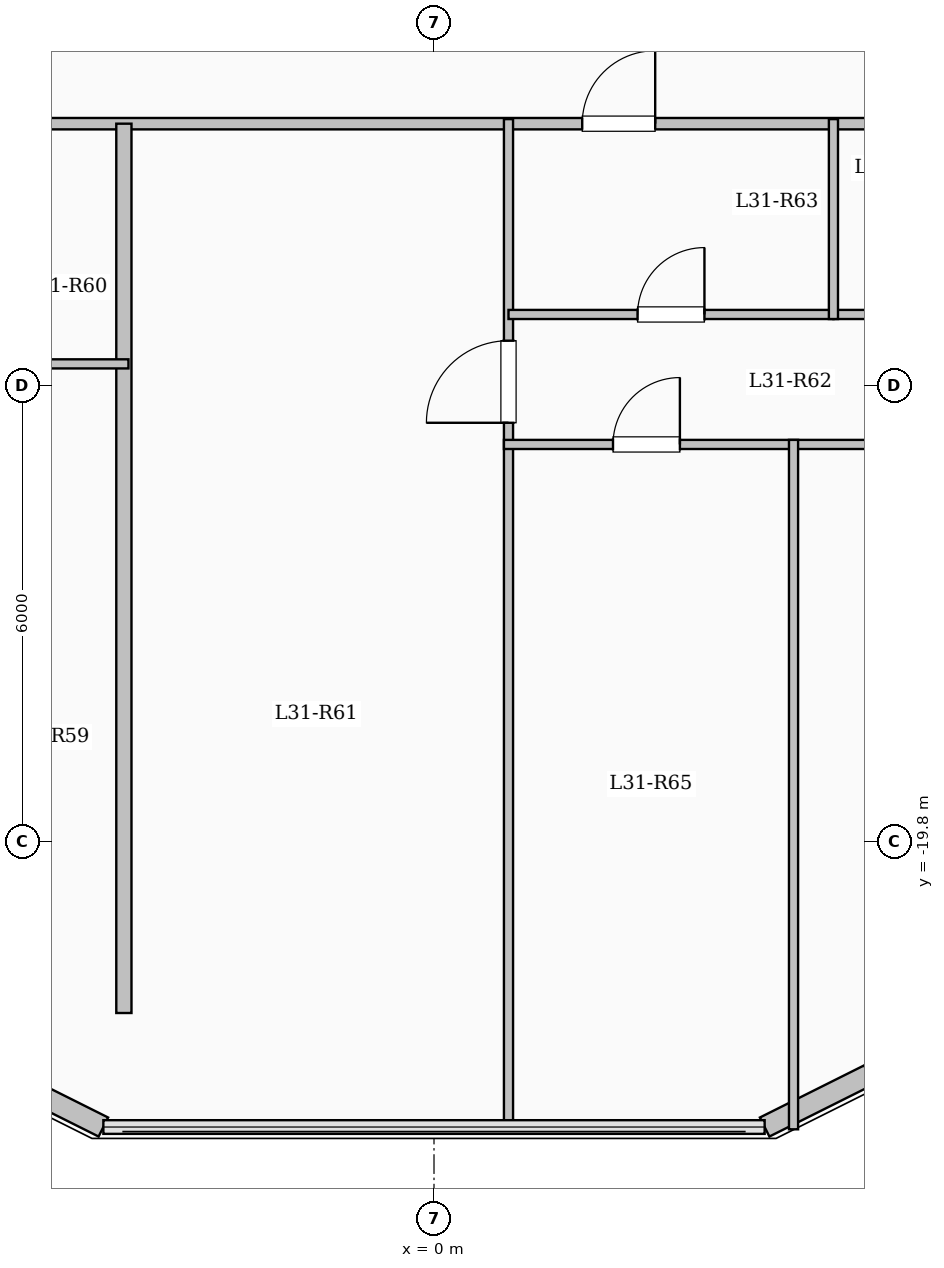
"""IFC4 building model, lengths in metres.
Left out: names, types, materials, properties, quantities, classifications, styles, units other than length and angle.
Written with IfcOpenShell. Run it as: python <this file> out.ifc"""

import sys

from ifc_helpers import new_model, si_unit, direction, frame, frame_2d, origin, place, context, subcontext, project, spatial, rectangle, extrude, element, fill, save


model = new_model("IFC4")
c1 = context("Model", 3, precision=1e-05, world=origin(), true_north=direction((0.0, 1.0)))
c2 = subcontext(c1, "Body", "Model", "MODEL_VIEW")
j1 = project(units=[si_unit("LENGTHUNIT", "METRE"), si_unit("PLANEANGLEUNIT", "RADIAN")], contexts=[c1])
p1 = place(None, origin())
s1 = spatial("IfcSite", under=j1, at=p1, CompositionType="ELEMENT")
p2 = place(p1, origin())
s2 = spatial("IfcBuilding", under=s1, at=p2, CompositionType="ELEMENT")
p3 = place(p2, frame((0.0, 0.0, 115.15)))
s3 = spatial("IfcBuildingStorey", under=s2, at=p3, CompositionType="ELEMENT", Elevation=115.15)
p4 = place(p3, frame((7.35, -22.05, 0.0), z_axis=(0.0, 0.0, 1.0), x_axis=(-0.894427191, -0.4472135955, 0.0)))
e1 = element("IfcWall", 1, at=p4, inside=s3, PredefinedType="SOLIDWALL", context=c2, shape_type="SweptSolid", body=[
    extrude(rectangle(XDim=3.354, YDim=0.28, at=frame_2d((1.677, 0.0))), origin(), (0.0, 0.0, 1.0), 3.05),
])
p5 = place(p4, frame((0.622, 0.0, 0.95)))
e2 = element("IfcOpeningElement", 2, at=p5, cuts=e1, PredefinedType="OPENING", context=c2, shape_type="SweptSolid", body=[
    extrude(rectangle(XDim=1.2, YDim=1.5, at=frame_2d((0.6, 0.75))), frame((0.0, 0.15, 0.0), z_axis=(0.0, -1.0, 0.0), x_axis=(1.0, 0.0, 0.0)), (0.0, 0.0, 1.0), 0.3),
])
p6 = place(p3, frame((-4.35, -23.55, 0.0), z_axis=(0.0, 0.0, 1.0), x_axis=(-0.894427191, 0.4472135955, 0.0)))
e3 = element("IfcWall", 3, at=p6, inside=s3, PredefinedType="SOLIDWALL", context=c2, shape_type="SweptSolid", body=[
    extrude(rectangle(XDim=3.354, YDim=0.28, at=frame_2d((1.677, 0.0))), origin(), (0.0, 0.0, 1.0), 3.05),
])
p7 = place(p6, frame((2.124, 0.0, 0.95)))
e4 = element("IfcOpeningElement", 4, at=p7, cuts=e3, PredefinedType="OPENING", context=c2, shape_type="SweptSolid", body=[
    extrude(rectangle(XDim=0.85, YDim=1.5, at=frame_2d((0.425, 0.75))), frame((0.0, 0.15, 0.0), z_axis=(0.0, -1.0, 0.0), x_axis=(1.0, 0.0, 0.0)), (0.0, 0.0, 1.0), 0.3),
])
p8 = place(p3, frame((-8.55, -10.35, 0.0), z_axis=(0.0, 0.0, 1.0), x_axis=(1.0, 0.0, 0.0)))
e5 = element("IfcWall", 5, at=p8, inside=s3, PredefinedType="PARTITIONING", context=c2, shape_type="SweptSolid", body=[
    extrude(rectangle(XDim=17.1, YDim=0.15, at=frame_2d((8.55, 0.0))), origin(), (0.0, 0.0, 1.0), 3.05),
])
p9 = place(p8, frame((1.15, 0.0, 0.0)))
e6 = element("IfcOpeningElement", 6, at=p9, cuts=e5, PredefinedType="OPENING", context=c2, shape_type="SweptSolid", body=[
    extrude(rectangle(XDim=0.96, YDim=2.15, at=frame_2d((0.48, 1.075))), frame((0.0, 0.085, 0.0), z_axis=(0.0, -1.0, 0.0), x_axis=(1.0, 0.0, 0.0)), (0.0, 0.0, 1.0), 0.17),
])
p10 = place(p8, frame((10.5, 0.0, 0.0)))
e7 = element("IfcOpeningElement", 7, at=p10, cuts=e5, PredefinedType="OPENING", context=c2, shape_type="SweptSolid", body=[
    extrude(rectangle(XDim=0.96, YDim=2.15, at=frame_2d((0.48, 1.075))), frame((0.0, 0.085, 0.0), z_axis=(0.0, -1.0, 0.0), x_axis=(1.0, 0.0, 0.0)), (0.0, 0.0, 1.0), 0.17),
])
p11 = place(p3, frame((-4.08, -22.05, 0.0), z_axis=(0.0, 0.0, 1.0), x_axis=(0.0, 1.0, 0.0)))
e8 = element("IfcWall", 8, at=p11, inside=s3, PredefinedType="SOLIDWALL", context=c2, shape_type="SweptSolid", body=[
    extrude(rectangle(XDim=11.7, YDim=0.2, at=frame_2d((5.85, 0.0))), origin(), (0.0, 0.0, 1.0), 3.05),
])
p12 = place(p3, frame((-6.14, -13.51, 0.0), z_axis=(0.0, 0.0, 1.0), x_axis=(1.0, 0.0, 0.0)))
e9 = element("IfcWall", 9, at=p12, inside=s3, PredefinedType="PARTITIONING", context=c2, shape_type="SweptSolid", body=[
    extrude(rectangle(XDim=2.12, YDim=0.12, at=frame_2d((1.06, 0.0))), origin(), (0.0, 0.0, 1.0), 3.05),
])
p13 = place(p3, frame((0.98, -23.58, 0.0), z_axis=(0.0, 0.0, 1.0), x_axis=(0.0, 1.0, 0.0)))
e10 = element("IfcWall", 10, at=p13, inside=s3, PredefinedType="PARTITIONING", context=c2, shape_type="SweptSolid", body=[
    extrude(rectangle(XDim=13.29, YDim=0.12, at=frame_2d((6.645, 0.0))), origin(), (0.0, 0.0, 1.0), 3.05),
])
p14 = place(p13, frame((9.295, 0.0, 0.0)))
e11 = element("IfcOpeningElement", 11, at=p14, cuts=e10, PredefinedType="OPENING", context=c2, shape_type="SweptSolid", body=[
    extrude(rectangle(XDim=1.08, YDim=2.15, at=frame_2d((0.54, 1.075))), frame((0.0, 0.07, 0.0), z_axis=(0.0, -1.0, 0.0), x_axis=(1.0, 0.0, 0.0)), (0.0, 0.0, 1.0), 0.14),
])
p15 = place(p3, frame((0.98, -12.86, 0.0), z_axis=(0.0, 0.0, 1.0), x_axis=(1.0, 0.0, 0.0)))
e12 = element("IfcWall", 12, at=p15, inside=s3, PredefinedType="PARTITIONING", context=c2, shape_type="SweptSolid", body=[
    extrude(rectangle(XDim=4.275, YDim=0.12, at=frame_2d((2.137, 0.0))), origin(), (0.0, 0.0, 1.0), 3.05),
])
p16 = place(p15, frame((1.698, 0.0, 0.0)))
e13 = element("IfcOpeningElement", 13, at=p16, cuts=e12, PredefinedType="OPENING", context=c2, shape_type="SweptSolid", body=[
    extrude(rectangle(XDim=0.88, YDim=2.1, at=frame_2d((0.44, 1.05))), frame((0.0, 0.07, 0.0), z_axis=(0.0, -1.0, 0.0), x_axis=(1.0, 0.0, 0.0)), (0.0, 0.0, 1.0), 0.14),
])
p17 = place(p3, frame((5.255, -12.86, 0.0), z_axis=(0.0, 0.0, 1.0), x_axis=(1.0, 0.0, 0.0)))
e14 = element("IfcWall", 14, at=p17, inside=s3, PredefinedType="PARTITIONING", context=c2, shape_type="SweptSolid", body=[
    extrude(rectangle(XDim=3.295, YDim=0.12, at=frame_2d((1.647, 0.0))), origin(), (0.0, 0.0, 1.0), 3.05),
])
p18 = place(p17, frame((1.208, 0.0, 0.0)))
e15 = element("IfcOpeningElement", 15, at=p18, cuts=e14, PredefinedType="OPENING", context=c2, shape_type="SweptSolid", body=[
    extrude(rectangle(XDim=0.88, YDim=2.1, at=frame_2d((0.44, 1.05))), frame((0.0, 0.07, 0.0), z_axis=(0.0, -1.0, 0.0), x_axis=(1.0, 0.0, 0.0)), (0.0, 0.0, 1.0), 0.14),
])
p19 = place(p3, frame((0.92, -14.57, 0.0), z_axis=(0.0, 0.0, 1.0), x_axis=(1.0, 0.0, 0.0)))
e16 = element("IfcWall", 16, at=p19, inside=s3, PredefinedType="PARTITIONING", context=c2, shape_type="SweptSolid", body=[
    extrude(rectangle(XDim=7.69, YDim=0.12, at=frame_2d((3.845, 0.0))), origin(), (0.0, 0.0, 1.0), 2.585),
])
p20 = place(p19, frame((1.435, 0.0, 0.0)))
e17 = element("IfcOpeningElement", 17, at=p20, cuts=e16, PredefinedType="OPENING", context=c2, shape_type="SweptSolid", body=[
    extrude(rectangle(XDim=0.88, YDim=2.1, at=frame_2d((0.44, 1.05))), frame((0.0, 0.07, 0.0), z_axis=(0.0, -1.0, 0.0), x_axis=(1.0, 0.0, 0.0)), (0.0, 0.0, 1.0), 0.14),
])
p21 = place(p19, frame((5.185, 0.0, 0.0)))
e18 = element("IfcOpeningElement", 18, at=p21, cuts=e16, PredefinedType="OPENING", context=c2, shape_type="SweptSolid", body=[
    extrude(rectangle(XDim=0.88, YDim=2.1, at=frame_2d((0.44, 1.05))), frame((0.0, 0.07, 0.0), z_axis=(0.0, -1.0, 0.0), x_axis=(1.0, 0.0, 0.0)), (0.0, 0.0, 1.0), 0.14),
])
p22 = place(p3, frame((5.255, -12.92, 0.0), z_axis=(0.0, 0.0, 1.0), x_axis=(0.0, 1.0, 0.0)))
e19 = element("IfcWall", 19, at=p22, inside=s3, PredefinedType="PARTITIONING", context=c2, shape_type="SweptSolid", body=[
    extrude(rectangle(XDim=2.63, YDim=0.12, at=frame_2d((1.315, 0.0))), origin(), (0.0, 0.0, 1.0), 3.05),
])
p23 = place(p3, frame((4.73, -23.58, 0.0), z_axis=(0.0, 0.0, 1.0), x_axis=(0.0, 1.0, 0.0)))
e20 = element("IfcWall", 20, at=p23, inside=s3, PredefinedType="PARTITIONING", context=c2, shape_type="SweptSolid", body=[
    extrude(rectangle(XDim=9.07, YDim=0.12, at=frame_2d((4.535, 0.0))), origin(), (0.0, 0.0, 1.0), 3.05),
])
p24 = place(p10, origin())
e21 = element("IfcDoor", 21, at=p24, inside=s3, OperationType="SINGLE_SWING_RIGHT", PredefinedType="DOOR", context=c2, shape_type="SweptSolid", body=[
    extrude(rectangle(XDim=0.96, YDim=2.15, at=frame_2d((0.48, 1.075))), frame((0.0, 0.025, 0.0), z_axis=(0.0, -1.0, 0.0), x_axis=(1.0, 0.0, 0.0)), (0.0, 0.0, 1.0), 0.05),
])
fill(e7, e21)
p25 = place(p14, origin())
e22 = element("IfcDoor", 22, at=p25, inside=s3, OperationType="SINGLE_SWING_LEFT", PredefinedType="DOOR", context=c2, shape_type="SweptSolid", body=[
    extrude(rectangle(XDim=1.08, YDim=2.15, at=frame_2d((0.54, 1.075))), frame((0.0, 0.025, 0.0), z_axis=(0.0, -1.0, 0.0), x_axis=(1.0, 0.0, 0.0)), (0.0, 0.0, 1.0), 0.05),
])
fill(e11, e22)
p26 = place(p16, origin())
e23 = element("IfcDoor", 23, at=p26, inside=s3, OperationType="SINGLE_SWING_RIGHT", PredefinedType="DOOR", context=c2, shape_type="SweptSolid", body=[
    extrude(rectangle(XDim=0.88, YDim=2.1, at=frame_2d((0.44, 1.05))), frame((0.0, 0.025, 0.0), z_axis=(0.0, -1.0, 0.0), x_axis=(1.0, 0.0, 0.0)), (0.0, 0.0, 1.0), 0.05),
])
fill(e13, e23)
p27 = place(p20, origin())
e24 = element("IfcDoor", 24, at=p27, inside=s3, OperationType="SINGLE_SWING_RIGHT", PredefinedType="DOOR", context=c2, shape_type="SweptSolid", body=[
    extrude(rectangle(XDim=0.88, YDim=2.1, at=frame_2d((0.44, 1.05))), frame((0.0, 0.025, 0.0), z_axis=(0.0, -1.0, 0.0), x_axis=(1.0, 0.0, 0.0)), (0.0, 0.0, 1.0), 0.05),
])
fill(e17, e24)
save(model, sys.argv[1])
